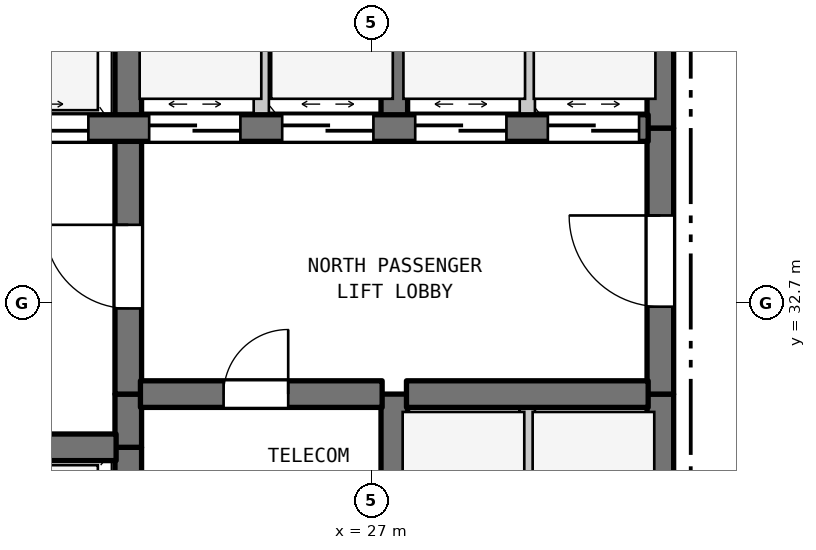
"""IFC4 building model, lengths in metres.
Left out: names, types, materials, properties, quantities, classifications, styles, units other than length and angle.
Written with IfcOpenShell. Run it as: python <this file> out.ifc"""

import sys

from ifc_helpers import new_model, si_unit, direction, frame, frame_2d, origin, place, context, subcontext, project, spatial, rectangle, extrude, element, fill, save


model = new_model("IFC4")
c1 = context("Model", 3, precision=1e-05, world=origin(), true_north=direction((0.0, 1.0)))
c2 = subcontext(c1, "Body", "Model", "MODEL_VIEW")
j1 = project(units=[si_unit("LENGTHUNIT", "METRE"), si_unit("PLANEANGLEUNIT", "RADIAN")], contexts=[c1])
p1 = place(None, origin())
s1 = spatial("IfcSite", under=j1, at=p1, CompositionType="ELEMENT")
p2 = place(p1, origin())
s2 = spatial("IfcBuilding", under=s1, at=p2, CompositionType="ELEMENT")
p3 = place(p2, frame((0.0, 0.0, 24.0)))
s3 = spatial("IfcBuildingStorey", under=s2, at=p3, CompositionType="ELEMENT", Elevation=24.0)
p4 = place(p3, frame((23.8, 29.5, 0.0), z_axis=(0.0, 0.0, 1.0), x_axis=(0.0, 1.0, 0.0)))
e1 = element("IfcWall", 1, at=p4, inside=s3, PredefinedType="SHEAR", context=c2, shape_type="SweptSolid", body=[
    extrude(rectangle(XDim=1.3, YDim=0.35, at=frame_2d((0.65, 0.0))), origin(), (0.0, 0.0, 1.0), 3.385),
])
p5 = place(p3, frame((23.8, 30.8, 0.0), z_axis=(0.0, 0.0, 1.0), x_axis=(0.0, 1.0, 0.0)))
e2 = element("IfcWall", 2, at=p5, inside=s3, PredefinedType="SHEAR", context=c2, shape_type="SweptSolid", body=[
    extrude(rectangle(XDim=0.7, YDim=0.35, at=frame_2d((0.35, 0.0))), origin(), (0.0, 0.0, 1.0), 3.385),
])
p6 = place(p3, frame((23.8, 31.5, 0.0), z_axis=(0.0, 0.0, 1.0), x_axis=(0.0, 1.0, 0.0)))
e3 = element("IfcWall", 3, at=p6, inside=s3, PredefinedType="SHEAR", context=c2, shape_type="SweptSolid", body=[
    extrude(rectangle(XDim=3.5, YDim=0.35, at=frame_2d((1.75, 0.0))), origin(), (0.0, 0.0, 1.0), 3.385),
])
p7 = place(p6, frame((1.127, 0.0, 0.0)))
e4 = element("IfcOpeningElement", 4, at=p7, cuts=e3, PredefinedType="OPENING", context=c2, shape_type="SweptSolid", body=[
    extrude(rectangle(XDim=1.1, YDim=2.15, at=frame_2d((0.55, 1.075))), frame((0.0, 0.185, 0.0), z_axis=(0.0, -1.0, 0.0), x_axis=(1.0, 0.0, 0.0)), (0.0, 0.0, 1.0), 0.37),
])
p8 = place(p3, frame((23.8, 35.0, 0.0), z_axis=(0.0, 0.0, 1.0), x_axis=(0.0, 1.0, 0.0)))
e5 = element("IfcWall", 5, at=p8, inside=s3, PredefinedType="SHEAR", context=c2, shape_type="SweptSolid", body=[
    extrude(rectangle(XDim=2.9, YDim=0.35, at=frame_2d((1.45, 0.0))), origin(), (0.0, 0.0, 1.0), 3.385),
])
p9 = place(p3, frame((25.55, 35.0, 0.0), z_axis=(0.0, 0.0, 1.0), x_axis=(0.0, 1.0, 0.0)))
e6 = element("IfcWall", 6, at=p9, inside=s3, PredefinedType="STANDARD", context=c2, shape_type="SweptSolid", body=[
    extrude(rectangle(XDim=2.9, YDim=0.2, at=frame_2d((1.45, 0.0))), origin(), (0.0, 0.0, 1.0), 3.385),
])
p10 = place(p3, frame((27.3, 29.5, 0.0), z_axis=(0.0, 0.0, 1.0), x_axis=(0.0, 1.0, 0.0)))
e7 = element("IfcWall", 7, at=p10, inside=s3, PredefinedType="SHEAR", context=c2, shape_type="SweptSolid", body=[
    extrude(rectangle(XDim=2.0, YDim=0.35, at=frame_2d((1.0, 0.0))), origin(), (0.0, 0.0, 1.0), 3.385),
])
p11 = place(p3, frame((27.3, 35.0, 0.0), z_axis=(0.0, 0.0, 1.0), x_axis=(0.0, 1.0, 0.0)))
e8 = element("IfcWall", 8, at=p11, inside=s3, PredefinedType="SHEAR", context=c2, shape_type="SweptSolid", body=[
    extrude(rectangle(XDim=2.9, YDim=0.35, at=frame_2d((1.45, 0.0))), origin(), (0.0, 0.0, 1.0), 3.385),
])
p12 = place(p3, frame((29.05, 28.9, 0.0), z_axis=(0.0, 0.0, 1.0), x_axis=(0.0, 1.0, 0.0)))
e9 = element("IfcWall", 9, at=p12, inside=s3, PredefinedType="STANDARD", context=c2, shape_type="SweptSolid", body=[
    extrude(rectangle(XDim=2.6, YDim=0.2, at=frame_2d((1.3, 0.0))), origin(), (0.0, 0.0, 1.0), 3.385),
])
p13 = place(p3, frame((29.05, 35.0, 0.0), z_axis=(0.0, 0.0, 1.0), x_axis=(0.0, 1.0, 0.0)))
e10 = element("IfcWall", 10, at=p13, inside=s3, PredefinedType="STANDARD", context=c2, shape_type="SweptSolid", body=[
    extrude(rectangle(XDim=2.9, YDim=0.2, at=frame_2d((1.45, 0.0))), origin(), (0.0, 0.0, 1.0), 3.385),
])
p14 = place(p3, frame((30.8, 28.9, 0.0), z_axis=(0.0, 0.0, 1.0), x_axis=(0.0, 1.0, 0.0)))
e11 = element("IfcWall", 11, at=p14, inside=s3, PredefinedType="SHEAR", context=c2, shape_type="SweptSolid", body=[
    extrude(rectangle(XDim=2.6, YDim=0.35, at=frame_2d((1.3, 0.0))), origin(), (0.0, 0.0, 1.0), 3.385),
])
p15 = place(p3, frame((30.8, 31.5, 0.0), z_axis=(0.0, 0.0, 1.0), x_axis=(0.0, 1.0, 0.0)))
e12 = element("IfcWall", 12, at=p15, inside=s3, PredefinedType="SHEAR", context=c2, shape_type="SweptSolid", body=[
    extrude(rectangle(XDim=3.5, YDim=0.35, at=frame_2d((1.75, 0.0))), origin(), (0.0, 0.0, 1.0), 3.385),
])
p16 = place(p15, frame((1.15, 0.0, 0.0)))
e13 = element("IfcOpeningElement", 13, at=p16, cuts=e12, PredefinedType="OPENING", context=c2, shape_type="SweptSolid", body=[
    extrude(rectangle(XDim=1.2, YDim=2.2, at=frame_2d((0.6, 1.1))), frame((0.0, 0.185, 0.0), z_axis=(0.0, -1.0, 0.0), x_axis=(1.0, 0.0, 0.0)), (0.0, 0.0, 1.0), 0.37),
])
p17 = place(p3, frame((30.8, 35.0, 0.0), z_axis=(0.0, 0.0, 1.0), x_axis=(0.0, 1.0, 0.0)))
e14 = element("IfcWall", 14, at=p17, inside=s3, PredefinedType="SHEAR", context=c2, shape_type="SweptSolid", body=[
    extrude(rectangle(XDim=2.9, YDim=0.35, at=frame_2d((1.45, 0.0))), origin(), (0.0, 0.0, 1.0), 3.385),
])
p18 = place(p3, frame((19.16, 30.8, 0.0), z_axis=(0.0, 0.0, 1.0), x_axis=(1.0, 0.0, 0.0)))
e15 = element("IfcWall", 15, at=p18, inside=s3, PredefinedType="SHEAR", context=c2, shape_type="SweptSolid", body=[
    extrude(rectangle(XDim=4.48, YDim=0.35, at=frame_2d((2.24, 0.0))), origin(), (0.0, 0.0, 1.0), 3.385),
])
p19 = place(p3, frame((23.96, 31.5, 0.0), z_axis=(0.0, 0.0, 1.0), x_axis=(1.0, 0.0, 0.0)))
e16 = element("IfcWall", 16, at=p19, inside=s3, PredefinedType="SHEAR", context=c2, shape_type="SweptSolid", body=[
    extrude(rectangle(XDim=3.18, YDim=0.35, at=frame_2d((1.59, 0.0))), origin(), (0.0, 0.0, 1.0), 3.385),
])
p20 = place(p19, frame((1.094, 0.0, 0.0)))
e17 = element("IfcOpeningElement", 17, at=p20, cuts=e16, PredefinedType="OPENING", context=c2, shape_type="SweptSolid", body=[
    extrude(rectangle(XDim=0.85, YDim=2.1, at=frame_2d((0.425, 1.05))), frame((0.0, 0.185, 0.0), z_axis=(0.0, -1.0, 0.0), x_axis=(1.0, 0.0, 0.0)), (0.0, 0.0, 1.0), 0.37),
])
p21 = place(p3, frame((27.46, 31.5, 0.0), z_axis=(0.0, 0.0, 1.0), x_axis=(1.0, 0.0, 0.0)))
e18 = element("IfcWall", 18, at=p21, inside=s3, PredefinedType="SHEAR", context=c2, shape_type="SweptSolid", body=[
    extrude(rectangle(XDim=3.18, YDim=0.35, at=frame_2d((1.59, 0.0))), origin(), (0.0, 0.0, 1.0), 3.385),
])
p22 = place(p3, frame((19.16, 35.0, 0.0), z_axis=(0.0, 0.0, 1.0), x_axis=(1.0, 0.0, 0.0)))
e19 = element("IfcWall", 19, at=p22, inside=s3, PredefinedType="SHEAR", context=c2, shape_type="SweptSolid", body=[
    extrude(rectangle(XDim=11.48, YDim=0.35, at=frame_2d((5.74, 0.0))), origin(), (0.0, 0.0, 1.0), 3.385),
])
p23 = place(p22, frame((0.365, 0.0, 0.0)))
e20 = element("IfcOpeningElement", 20, at=p23, cuts=e19, PredefinedType="OPENING", context=c2, shape_type="SweptSolid", body=[
    extrude(rectangle(XDim=1.35, YDim=2.2, at=frame_2d((0.675, 1.1))), frame((0.0, 0.185, 0.0), z_axis=(0.0, -1.0, 0.0), x_axis=(1.0, 0.0, 0.0)), (0.0, 0.0, 1.0), 0.37),
])
p24 = place(p22, frame((2.765, 0.0, 0.0)))
e21 = element("IfcOpeningElement", 21, at=p24, cuts=e19, PredefinedType="OPENING", context=c2, shape_type="SweptSolid", body=[
    extrude(rectangle(XDim=1.35, YDim=2.2, at=frame_2d((0.675, 1.1))), frame((0.0, 0.185, 0.0), z_axis=(0.0, -1.0, 0.0), x_axis=(1.0, 0.0, 0.0)), (0.0, 0.0, 1.0), 0.37),
])
p25 = place(p22, frame((4.915, 0.0, 0.0)))
e22 = element("IfcOpeningElement", 22, at=p25, cuts=e19, PredefinedType="OPENING", context=c2, shape_type="SweptSolid", body=[
    extrude(rectangle(XDim=1.2, YDim=2.2, at=frame_2d((0.6, 1.1))), frame((0.0, 0.185, 0.0), z_axis=(0.0, -1.0, 0.0), x_axis=(1.0, 0.0, 0.0)), (0.0, 0.0, 1.0), 0.37),
])
p26 = place(p22, frame((6.665, 0.0, 0.0)))
e23 = element("IfcOpeningElement", 23, at=p26, cuts=e19, PredefinedType="OPENING", context=c2, shape_type="SweptSolid", body=[
    extrude(rectangle(XDim=1.2, YDim=2.2, at=frame_2d((0.6, 1.1))), frame((0.0, 0.185, 0.0), z_axis=(0.0, -1.0, 0.0), x_axis=(1.0, 0.0, 0.0)), (0.0, 0.0, 1.0), 0.37),
])
p27 = place(p22, frame((8.415, 0.0, 0.0)))
e24 = element("IfcOpeningElement", 24, at=p27, cuts=e19, PredefinedType="OPENING", context=c2, shape_type="SweptSolid", body=[
    extrude(rectangle(XDim=1.2, YDim=2.2, at=frame_2d((0.6, 1.1))), frame((0.0, 0.185, 0.0), z_axis=(0.0, -1.0, 0.0), x_axis=(1.0, 0.0, 0.0)), (0.0, 0.0, 1.0), 0.37),
])
p28 = place(p22, frame((10.16, 0.0, 0.0)))
e25 = element("IfcOpeningElement", 25, at=p28, cuts=e19, PredefinedType="OPENING", context=c2, shape_type="SweptSolid", body=[
    extrude(rectangle(XDim=1.2, YDim=2.2, at=frame_2d((0.6, 1.1))), frame((0.0, 0.185, 0.0), z_axis=(0.0, -1.0, 0.0), x_axis=(1.0, 0.0, 0.0)), (0.0, 0.0, 1.0), 0.37),
])
p29 = place(p7, origin())
e26 = element("IfcDoor", 26, at=p29, inside=s3, OperationType="SINGLE_SWING_RIGHT", PredefinedType="DOOR", context=c2, shape_type="SweptSolid", body=[
    extrude(rectangle(XDim=1.1, YDim=2.15, at=frame_2d((0.55, 1.075))), frame((0.0, 0.025, 0.0), z_axis=(0.0, -1.0, 0.0), x_axis=(1.0, 0.0, 0.0)), (0.0, 0.0, 1.0), 0.05),
])
fill(e4, e26)
p30 = place(p16, origin())
e27 = element("IfcDoor", 27, at=p30, inside=s3, OperationType="SINGLE_SWING_RIGHT", PredefinedType="DOOR", context=c2, shape_type="SweptSolid", body=[
    extrude(rectangle(XDim=1.2, YDim=2.2, at=frame_2d((0.6, 1.1))), frame((0.0, 0.025, 0.0), z_axis=(0.0, -1.0, 0.0), x_axis=(1.0, 0.0, 0.0)), (0.0, 0.0, 1.0), 0.05),
])
fill(e13, e27)
p31 = place(p20, origin())
e28 = element("IfcDoor", 28, at=p31, inside=s3, OperationType="SINGLE_SWING_RIGHT", PredefinedType="DOOR", context=c2, shape_type="SweptSolid", body=[
    extrude(rectangle(XDim=0.85, YDim=2.1, at=frame_2d((0.425, 1.05))), frame((0.0, 0.025, 0.0), z_axis=(0.0, -1.0, 0.0), x_axis=(1.0, 0.0, 0.0)), (0.0, 0.0, 1.0), 0.05),
])
fill(e17, e28)
p32 = place(p24, origin())
e29 = element("IfcDoor", 29, at=p32, inside=s3, OperationType="DOUBLE_DOOR_SLIDING", PredefinedType="DOOR", context=c2, shape_type="SweptSolid", body=[
    extrude(rectangle(XDim=1.35, YDim=2.2, at=frame_2d((0.675, 1.1))), frame((0.0, 0.025, 0.0), z_axis=(0.0, -1.0, 0.0), x_axis=(1.0, 0.0, 0.0)), (0.0, 0.0, 1.0), 0.05),
])
fill(e21, e29)
p33 = place(p25, origin())
e30 = element("IfcDoor", 30, at=p33, inside=s3, OperationType="DOUBLE_DOOR_SLIDING", PredefinedType="DOOR", context=c2, shape_type="SweptSolid", body=[
    extrude(rectangle(XDim=1.2, YDim=2.2, at=frame_2d((0.6, 1.1))), frame((0.0, 0.025, 0.0), z_axis=(0.0, -1.0, 0.0), x_axis=(1.0, 0.0, 0.0)), (0.0, 0.0, 1.0), 0.05),
])
fill(e22, e30)
p34 = place(p26, origin())
e31 = element("IfcDoor", 31, at=p34, inside=s3, OperationType="DOUBLE_DOOR_SLIDING", PredefinedType="DOOR", context=c2, shape_type="SweptSolid", body=[
    extrude(rectangle(XDim=1.2, YDim=2.2, at=frame_2d((0.6, 1.1))), frame((0.0, 0.025, 0.0), z_axis=(0.0, -1.0, 0.0), x_axis=(1.0, 0.0, 0.0)), (0.0, 0.0, 1.0), 0.05),
])
fill(e23, e31)
p35 = place(p27, origin())
e32 = element("IfcDoor", 32, at=p35, inside=s3, OperationType="DOUBLE_DOOR_SLIDING", PredefinedType="DOOR", context=c2, shape_type="SweptSolid", body=[
    extrude(rectangle(XDim=1.2, YDim=2.2, at=frame_2d((0.6, 1.1))), frame((0.0, 0.025, 0.0), z_axis=(0.0, -1.0, 0.0), x_axis=(1.0, 0.0, 0.0)), (0.0, 0.0, 1.0), 0.05),
])
fill(e24, e32)
p36 = place(p28, origin())
e33 = element("IfcDoor", 33, at=p36, inside=s3, OperationType="DOUBLE_DOOR_SLIDING", PredefinedType="DOOR", context=c2, shape_type="SweptSolid", body=[
    extrude(rectangle(XDim=1.2, YDim=2.2, at=frame_2d((0.6, 1.1))), frame((0.0, 0.025, 0.0), z_axis=(0.0, -1.0, 0.0), x_axis=(1.0, 0.0, 0.0)), (0.0, 0.0, 1.0), 0.05),
])
fill(e25, e33)
save(model, sys.argv[1])
